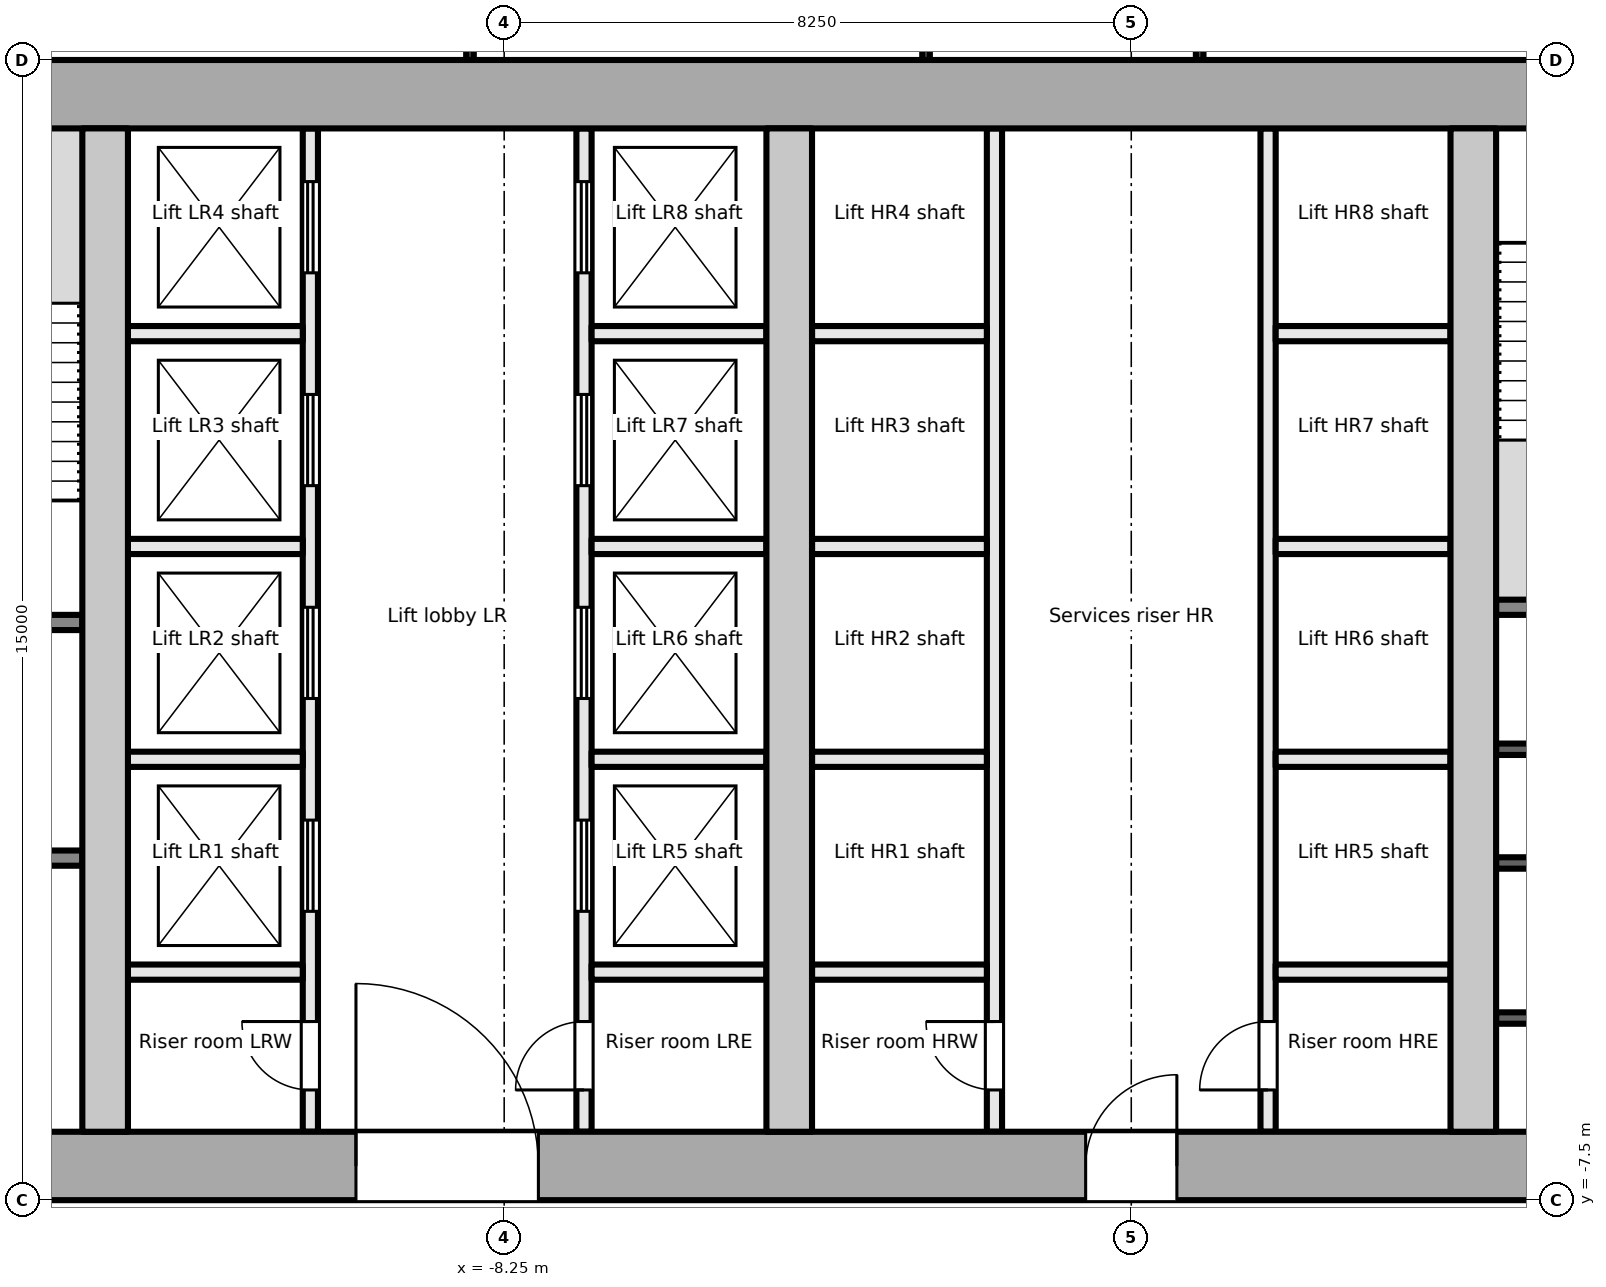
"""IFC4 building model, lengths in metres.
Left out: names, types, materials, properties, quantities, classifications, styles, units other than length and angle.
Written with IfcOpenShell. Run it as: python <this file> out.ifc"""

import sys

from ifc_helpers import new_model, si_unit, direction, frame, frame_2d, origin, place, context, subcontext, project, spatial, rectangle, extrude, element, fill, save


model = new_model("IFC4")
c1 = context("Model", 3, precision=1e-05, world=origin(), true_north=direction((0.0, 1.0)))
c2 = subcontext(c1, "Body", "Model", "MODEL_VIEW")
j1 = project(units=[si_unit("LENGTHUNIT", "METRE"), si_unit("PLANEANGLEUNIT", "RADIAN")], contexts=[c1])
p1 = place(None, origin())
s1 = spatial("IfcSite", under=j1, at=p1, CompositionType="ELEMENT")
p2 = place(p1, origin())
s2 = spatial("IfcBuilding", under=s1, at=p2, CompositionType="ELEMENT")
p3 = place(p2, frame((0.0, 0.0, 130.1)))
s3 = spatial("IfcBuildingStorey", under=s2, at=p3, CompositionType="ELEMENT", Elevation=130.1)
p4 = place(p3, frame((-18.0, -7.05, -0.2), z_axis=(0.0, 0.0, 1.0), x_axis=(1.0, 0.0, 0.0)))
e1 = element("IfcWall", 1, at=p4, inside=s3, PredefinedType="SHEAR", context=c2, shape_type="SweptSolid", body=[
    extrude(rectangle(XDim=36.0, YDim=0.9, at=frame_2d((18.0, 0.0))), origin(), (0.0, 0.0, 1.0), 4.0),
])
p5 = place(p4, frame((7.8, 0.0, 0.2)))
e2 = element("IfcOpeningElement", 2, at=p5, cuts=e1, PredefinedType="OPENING", context=c2, shape_type="SweptSolid", body=[
    extrude(rectangle(XDim=2.4, YDim=2.1, at=frame_2d((1.2, 1.05))), frame((0.0, 0.46, 0.0), z_axis=(0.0, -1.0, 0.0), x_axis=(1.0, 0.0, 0.0)), (0.0, 0.0, 1.0), 0.921),
])
p6 = place(p4, frame((17.4, 0.0, 0.2)))
e3 = element("IfcOpeningElement", 3, at=p6, cuts=e1, PredefinedType="OPENING", context=c2, shape_type="SweptSolid", body=[
    extrude(rectangle(XDim=1.2, YDim=2.1, at=frame_2d((0.6, 1.05))), frame((0.0, 0.46, 0.0), z_axis=(0.0, -1.0, 0.0), x_axis=(1.0, 0.0, 0.0)), (0.0, 0.0, 1.0), 0.921),
])
p7 = place(p4, frame((26.1, 0.0, 0.2)))
e4 = element("IfcOpeningElement", 4, at=p7, cuts=e1, PredefinedType="OPENING", context=c2, shape_type="SweptSolid", body=[
    extrude(rectangle(XDim=2.4, YDim=2.1, at=frame_2d((1.2, 1.05))), frame((0.0, 0.46, 0.0), z_axis=(0.0, -1.0, 0.0), x_axis=(1.0, 0.0, 0.0)), (0.0, 0.0, 1.0), 0.921),
])
p8 = place(p3, frame((-18.0, 7.05, -0.2), z_axis=(0.0, 0.0, 1.0), x_axis=(1.0, 0.0, 0.0)))
e5 = element("IfcWall", 5, at=p8, inside=s3, PredefinedType="SHEAR", context=c2, shape_type="SweptSolid", body=[
    extrude(rectangle(XDim=36.0, YDim=0.9, at=frame_2d((18.0, 0.0))), origin(), (0.0, 0.0, 1.0), 4.0),
])
for number, where, z_axis, x_axis in (
    (6, (-13.5, -6.6, -0.2), (0.0, 0.0, 1.0), (0.0, 1.0, 0.0)),
    (7, (-4.5, -6.6, -0.2), (0.0, 0.0, 1.0), (0.0, 1.0, 0.0)),
    (8, (4.5, -6.6, -0.2), (0.0, 0.0, 1.0), (0.0, 1.0, 0.0)),
):
    element("IfcWall", number, at=place(p3, frame(where, z_axis=z_axis, x_axis=x_axis)), inside=s3, PredefinedType="SHEAR", context=c2, shape_type="SweptSolid", body=[
        extrude(rectangle(XDim=13.2, YDim=0.6, at=frame_2d((6.6, 0.0))), origin(), (0.0, 0.0, 1.0), 4.0),
    ])
p9 = place(p3, frame((-17.1, -3.0, 0.0), z_axis=(0.0, 0.0, 1.0), x_axis=(1.0, 0.0, 0.0)))
e9 = element("IfcWall", 9, at=p9, inside=s3, PredefinedType="PARTITIONING", context=c2, shape_type="SweptSolid", body=[
    extrude(rectangle(XDim=3.3, YDim=0.2, at=frame_2d((1.65, 0.0))), origin(), (0.0, 0.0, 1.0), 3.8),
])
p10 = place(p9, frame((1.1, 0.0, 0.0)))
e10 = element("IfcOpeningElement", 10, at=p10, cuts=e9, PredefinedType="OPENING", context=c2, shape_type="SweptSolid", body=[
    extrude(rectangle(XDim=1.1, YDim=2.1, at=frame_2d((0.55, 1.05))), frame((0.0, 0.111, 0.0), z_axis=(0.0, -1.0, 0.0), x_axis=(1.0, 0.0, 0.0)), (0.0, 0.0, 1.0), 0.221),
])
p11 = place(p3, frame((-17.1, 0.1, 0.0), z_axis=(0.0, 0.0, 1.0), x_axis=(1.0, 0.0, 0.0)))
e11 = element("IfcWall", 11, at=p11, inside=s3, PredefinedType="PARTITIONING", context=c2, shape_type="SweptSolid", body=[
    extrude(rectangle(XDim=3.3, YDim=0.2, at=frame_2d((1.65, 0.0))), origin(), (0.0, 0.0, 1.0), 3.8),
])
p12 = place(p11, frame((1.1, 0.0, 0.0)))
e12 = element("IfcOpeningElement", 12, at=p12, cuts=e11, PredefinedType="OPENING", context=c2, shape_type="SweptSolid", body=[
    extrude(rectangle(XDim=1.1, YDim=2.1, at=frame_2d((0.55, 1.05))), frame((0.0, 0.111, 0.0), z_axis=(0.0, -1.0, 0.0), x_axis=(1.0, 0.0, 0.0)), (0.0, 0.0, 1.0), 0.221),
])
p13 = place(p3, frame((-10.8, -6.6, 0.0), z_axis=(0.0, 0.0, 1.0), x_axis=(0.0, 1.0, 0.0)))
e13 = element("IfcWall", 13, at=p13, inside=s3, PredefinedType="PARTITIONING", context=c2, shape_type="SweptSolid", body=[
    extrude(rectangle(XDim=13.2, YDim=0.2, at=frame_2d((6.6, 0.0))), origin(), (0.0, 0.0, 1.0), 3.8),
])
p14 = place(p13, frame((0.55, 0.0, 0.0)))
e14 = element("IfcOpeningElement", 14, at=p14, cuts=e13, PredefinedType="OPENING", context=c2, shape_type="SweptSolid", body=[
    extrude(rectangle(XDim=0.9, YDim=2.1, at=frame_2d((0.45, 1.05))), frame((0.0, 0.111, 0.0), z_axis=(0.0, -1.0, 0.0), x_axis=(1.0, 0.0, 0.0)), (0.0, 0.0, 1.0), 0.221),
])
p15 = place(p13, frame((2.9, 0.0, 0.0)))
e15 = element("IfcOpeningElement", 15, at=p15, cuts=e13, PredefinedType="OPENING", context=c2, shape_type="SweptSolid", body=[
    extrude(rectangle(XDim=1.2, YDim=2.1, at=frame_2d((0.6, 1.05))), frame((0.0, 0.111, 0.0), z_axis=(0.0, -1.0, 0.0), x_axis=(1.0, 0.0, 0.0)), (0.0, 0.0, 1.0), 0.221),
])
p16 = place(p13, frame((5.7, 0.0, 0.0)))
e16 = element("IfcOpeningElement", 16, at=p16, cuts=e13, PredefinedType="OPENING", context=c2, shape_type="SweptSolid", body=[
    extrude(rectangle(XDim=1.2, YDim=2.1, at=frame_2d((0.6, 1.05))), frame((0.0, 0.111, 0.0), z_axis=(0.0, -1.0, 0.0), x_axis=(1.0, 0.0, 0.0)), (0.0, 0.0, 1.0), 0.221),
])
p17 = place(p13, frame((8.5, 0.0, 0.0)))
e17 = element("IfcOpeningElement", 17, at=p17, cuts=e13, PredefinedType="OPENING", context=c2, shape_type="SweptSolid", body=[
    extrude(rectangle(XDim=1.2, YDim=2.1, at=frame_2d((0.6, 1.05))), frame((0.0, 0.111, 0.0), z_axis=(0.0, -1.0, 0.0), x_axis=(1.0, 0.0, 0.0)), (0.0, 0.0, 1.0), 0.221),
])
p18 = place(p13, frame((11.3, 0.0, 0.0)))
e18 = element("IfcOpeningElement", 18, at=p18, cuts=e13, PredefinedType="OPENING", context=c2, shape_type="SweptSolid", body=[
    extrude(rectangle(XDim=1.2, YDim=2.1, at=frame_2d((0.6, 1.05))), frame((0.0, 0.111, 0.0), z_axis=(0.0, -1.0, 0.0), x_axis=(1.0, 0.0, 0.0)), (0.0, 0.0, 1.0), 0.221),
])
p19 = place(p3, frame((-7.2, -6.6, 0.0), z_axis=(0.0, 0.0, 1.0), x_axis=(0.0, 1.0, 0.0)))
e19 = element("IfcWall", 19, at=p19, inside=s3, PredefinedType="PARTITIONING", context=c2, shape_type="SweptSolid", body=[
    extrude(rectangle(XDim=13.2, YDim=0.2, at=frame_2d((6.6, 0.0))), origin(), (0.0, 0.0, 1.0), 3.8),
])
p20 = place(p19, frame((0.55, 0.0, 0.0)))
e20 = element("IfcOpeningElement", 20, at=p20, cuts=e19, PredefinedType="OPENING", context=c2, shape_type="SweptSolid", body=[
    extrude(rectangle(XDim=0.9, YDim=2.1, at=frame_2d((0.45, 1.05))), frame((0.0, 0.111, 0.0), z_axis=(0.0, -1.0, 0.0), x_axis=(1.0, 0.0, 0.0)), (0.0, 0.0, 1.0), 0.221),
])
p21 = place(p19, frame((2.9, 0.0, 0.0)))
e21 = element("IfcOpeningElement", 21, at=p21, cuts=e19, PredefinedType="OPENING", context=c2, shape_type="SweptSolid", body=[
    extrude(rectangle(XDim=1.2, YDim=2.1, at=frame_2d((0.6, 1.05))), frame((0.0, 0.111, 0.0), z_axis=(0.0, -1.0, 0.0), x_axis=(1.0, 0.0, 0.0)), (0.0, 0.0, 1.0), 0.221),
])
p22 = place(p19, frame((5.7, 0.0, 0.0)))
e22 = element("IfcOpeningElement", 22, at=p22, cuts=e19, PredefinedType="OPENING", context=c2, shape_type="SweptSolid", body=[
    extrude(rectangle(XDim=1.2, YDim=2.1, at=frame_2d((0.6, 1.05))), frame((0.0, 0.111, 0.0), z_axis=(0.0, -1.0, 0.0), x_axis=(1.0, 0.0, 0.0)), (0.0, 0.0, 1.0), 0.221),
])
p23 = place(p19, frame((8.5, 0.0, 0.0)))
e23 = element("IfcOpeningElement", 23, at=p23, cuts=e19, PredefinedType="OPENING", context=c2, shape_type="SweptSolid", body=[
    extrude(rectangle(XDim=1.2, YDim=2.1, at=frame_2d((0.6, 1.05))), frame((0.0, 0.111, 0.0), z_axis=(0.0, -1.0, 0.0), x_axis=(1.0, 0.0, 0.0)), (0.0, 0.0, 1.0), 0.221),
])
p24 = place(p19, frame((11.3, 0.0, 0.0)))
e24 = element("IfcOpeningElement", 24, at=p24, cuts=e19, PredefinedType="OPENING", context=c2, shape_type="SweptSolid", body=[
    extrude(rectangle(XDim=1.2, YDim=2.1, at=frame_2d((0.6, 1.05))), frame((0.0, 0.111, 0.0), z_axis=(0.0, -1.0, 0.0), x_axis=(1.0, 0.0, 0.0)), (0.0, 0.0, 1.0), 0.221),
])
for number, where, z_axis, x_axis in (
    (25, (-13.2, -1.7, 0.0), (0.0, 0.0, 1.0), (1.0, 0.0, 0.0)),
    (26, (-13.2, 1.1, 0.0), (0.0, 0.0, 1.0), (1.0, 0.0, 0.0)),
    (27, (-13.2, 3.9, 0.0), (0.0, 0.0, 1.0), (1.0, 0.0, 0.0)),
    (28, (-13.2, -4.5, 0.0), (0.0, 0.0, 1.0), (1.0, 0.0, 0.0)),
    (29, (-7.1, -1.7, 0.0), (0.0, 0.0, 1.0), (1.0, 0.0, 0.0)),
    (30, (-7.1, 1.1, 0.0), (0.0, 0.0, 1.0), (1.0, 0.0, 0.0)),
    (31, (-7.1, 3.9, 0.0), (0.0, 0.0, 1.0), (1.0, 0.0, 0.0)),
    (32, (-7.1, -4.5, 0.0), (0.0, 0.0, 1.0), (1.0, 0.0, 0.0)),
):
    element("IfcWall", number, at=place(p3, frame(where, z_axis=z_axis, x_axis=x_axis)), inside=s3, PredefinedType="PARTITIONING", context=c2, shape_type="SweptSolid", body=[
        extrude(rectangle(XDim=2.3, YDim=0.2, at=frame_2d((1.15, 0.0))), origin(), (0.0, 0.0, 1.0), 3.8),
    ])
p25 = place(p3, frame((-1.8, -6.6, 0.0), z_axis=(0.0, 0.0, 1.0), x_axis=(0.0, 1.0, 0.0)))
e33 = element("IfcWall", 33, at=p25, inside=s3, PredefinedType="PARTITIONING", context=c2, shape_type="SweptSolid", body=[
    extrude(rectangle(XDim=13.2, YDim=0.2, at=frame_2d((6.6, 0.0))), origin(), (0.0, 0.0, 1.0), 3.8),
])
p26 = place(p25, frame((0.55, 0.0, 0.0)))
e34 = element("IfcOpeningElement", 34, at=p26, cuts=e33, PredefinedType="OPENING", context=c2, shape_type="SweptSolid", body=[
    extrude(rectangle(XDim=0.9, YDim=2.1, at=frame_2d((0.45, 1.05))), frame((0.0, 0.111, 0.0), z_axis=(0.0, -1.0, 0.0), x_axis=(1.0, 0.0, 0.0)), (0.0, 0.0, 1.0), 0.221),
])
p27 = place(p3, frame((1.8, -6.6, 0.0), z_axis=(0.0, 0.0, 1.0), x_axis=(0.0, 1.0, 0.0)))
e35 = element("IfcWall", 35, at=p27, inside=s3, PredefinedType="PARTITIONING", context=c2, shape_type="SweptSolid", body=[
    extrude(rectangle(XDim=13.2, YDim=0.2, at=frame_2d((6.6, 0.0))), origin(), (0.0, 0.0, 1.0), 3.8),
])
p28 = place(p27, frame((0.55, 0.0, 0.0)))
e36 = element("IfcOpeningElement", 36, at=p28, cuts=e35, PredefinedType="OPENING", context=c2, shape_type="SweptSolid", body=[
    extrude(rectangle(XDim=0.9, YDim=2.1, at=frame_2d((0.45, 1.05))), frame((0.0, 0.111, 0.0), z_axis=(0.0, -1.0, 0.0), x_axis=(1.0, 0.0, 0.0)), (0.0, 0.0, 1.0), 0.221),
])
for number, where, z_axis, x_axis in (
    (37, (-4.2, -1.7, 0.0), (0.0, 0.0, 1.0), (1.0, 0.0, 0.0)),
    (38, (-4.2, 1.1, 0.0), (0.0, 0.0, 1.0), (1.0, 0.0, 0.0)),
    (39, (-4.2, 3.9, 0.0), (0.0, 0.0, 1.0), (1.0, 0.0, 0.0)),
    (40, (-4.2, -4.5, 0.0), (0.0, 0.0, 1.0), (1.0, 0.0, 0.0)),
    (41, (1.9, -1.7, 0.0), (0.0, 0.0, 1.0), (1.0, 0.0, 0.0)),
    (42, (1.9, 1.1, 0.0), (0.0, 0.0, 1.0), (1.0, 0.0, 0.0)),
    (43, (1.9, 3.9, 0.0), (0.0, 0.0, 1.0), (1.0, 0.0, 0.0)),
    (44, (1.9, -4.5, 0.0), (0.0, 0.0, 1.0), (1.0, 0.0, 0.0)),
):
    element("IfcWall", number, at=place(p3, frame(where, z_axis=z_axis, x_axis=x_axis)), inside=s3, PredefinedType="PARTITIONING", context=c2, shape_type="SweptSolid", body=[
        extrude(rectangle(XDim=2.3, YDim=0.2, at=frame_2d((1.15, 0.0))), origin(), (0.0, 0.0, 1.0), 3.8),
    ])
p29 = place(p3, frame((4.8, 0.3, 0.0), z_axis=(0.0, 0.0, 1.0), x_axis=(1.0, 0.0, 0.0)))
e45 = element("IfcWall", 45, at=p29, inside=s3, PredefinedType="PARTITIONING", context=c2, shape_type="SweptSolid", body=[
    extrude(rectangle(XDim=3.15, YDim=0.2, at=frame_2d((1.575, 0.0))), origin(), (0.0, 0.0, 1.0), 3.8),
])
for number, where, z_axis, x_axis in (
    (46, (4.8, -5.104, 0.0), (0.0, 0.0, 1.0), (1.0, 0.0, 0.0)),
    (47, (4.8, -3.064, 0.0), (0.0, 0.0, 1.0), (1.0, 0.0, 0.0)),
    (48, (4.8, -1.568, 0.0), (0.0, 0.0, 1.0), (1.0, 0.0, 0.0)),
):
    element("IfcWall", number, at=place(p3, frame(where, z_axis=z_axis, x_axis=x_axis)), inside=s3, PredefinedType="PARTITIONING", context=c2, shape_type="SweptSolid", body=[
        extrude(rectangle(XDim=3.15, YDim=0.15, at=frame_2d((1.575, 0.0))), origin(), (0.0, 0.0, 1.0), 3.8),
    ])
p30 = place(p3, frame((-8.7, 7.5, 0.0), z_axis=(0.0, 0.0, 1.0), x_axis=(0.0, 1.0, 0.0)))
e49 = element("IfcWall", 49, at=p30, inside=s3, PredefinedType="PARTITIONING", context=c2, shape_type="SweptSolid", body=[
    extrude(rectangle(XDim=2.95, YDim=0.1, at=frame_2d((1.475, 0.0))), origin(), (0.0, 0.0, 1.0), 3.8),
])
p31 = place(p30, frame((0.575, 0.0, 0.9)))
e50 = element("IfcOpeningElement", 50, at=p31, cuts=e49, PredefinedType="OPENING", context=c2, shape_type="SweptSolid", body=[
    extrude(rectangle(XDim=1.8, YDim=1.2, at=frame_2d((0.9, 0.6))), frame((0.0, 0.061, 0.0), z_axis=(0.0, -1.0, 0.0), x_axis=(1.0, 0.0, 0.0)), (0.0, 0.0, 1.0), 0.121),
])
for number, where, z_axis, x_axis in (
    (51, (-2.7, 10.45, 0.0), (0.0, 0.0, 1.0), (0.0, -1.0, 0.0)),
    (52, (0.9, 10.45, 0.0), (0.0, 0.0, 1.0), (0.0, -1.0, 0.0)),
):
    element("IfcWall", number, at=place(p3, frame(where, z_axis=z_axis, x_axis=x_axis)), inside=s3, PredefinedType="PARTITIONING", context=c2, shape_type="SweptSolid", body=[
        extrude(rectangle(XDim=2.95, YDim=0.1, at=frame_2d((1.475, 0.0))), origin(), (0.0, 0.0, 1.0), 3.8),
    ])
p32 = place(p14, origin())
e53 = element("IfcDoor", 53, at=p32, inside=s3, OperationType="SINGLE_SWING_RIGHT", PredefinedType="DOOR", context=c2, shape_type="SweptSolid", body=[
    extrude(rectangle(XDim=0.9, YDim=2.1, at=frame_2d((0.45, 1.05))), frame((0.0, 0.025, 0.0), z_axis=(0.0, -1.0, 0.0), x_axis=(1.0, 0.0, 0.0)), (0.0, 0.0, 1.0), 0.05),
])
fill(e14, e53)
p33 = place(p15, origin())
e54 = element("IfcDoor", 54, at=p33, inside=s3, OperationType="DOUBLE_DOOR_SLIDING", PredefinedType="DOOR", context=c2, shape_type="SweptSolid", body=[
    extrude(rectangle(XDim=1.2, YDim=2.1, at=frame_2d((0.6, 1.05))), frame((0.0, 0.025, 0.0), z_axis=(0.0, -1.0, 0.0), x_axis=(1.0, 0.0, 0.0)), (0.0, 0.0, 1.0), 0.05),
])
fill(e15, e54)
p34 = place(p16, origin())
e55 = element("IfcDoor", 55, at=p34, inside=s3, OperationType="DOUBLE_DOOR_SLIDING", PredefinedType="DOOR", context=c2, shape_type="SweptSolid", body=[
    extrude(rectangle(XDim=1.2, YDim=2.1, at=frame_2d((0.6, 1.05))), frame((0.0, 0.025, 0.0), z_axis=(0.0, -1.0, 0.0), x_axis=(1.0, 0.0, 0.0)), (0.0, 0.0, 1.0), 0.05),
])
fill(e16, e55)
p35 = place(p17, origin())
e56 = element("IfcDoor", 56, at=p35, inside=s3, OperationType="DOUBLE_DOOR_SLIDING", PredefinedType="DOOR", context=c2, shape_type="SweptSolid", body=[
    extrude(rectangle(XDim=1.2, YDim=2.1, at=frame_2d((0.6, 1.05))), frame((0.0, 0.025, 0.0), z_axis=(0.0, -1.0, 0.0), x_axis=(1.0, 0.0, 0.0)), (0.0, 0.0, 1.0), 0.05),
])
fill(e17, e56)
p36 = place(p18, origin())
e57 = element("IfcDoor", 57, at=p36, inside=s3, OperationType="DOUBLE_DOOR_SLIDING", PredefinedType="DOOR", context=c2, shape_type="SweptSolid", body=[
    extrude(rectangle(XDim=1.2, YDim=2.1, at=frame_2d((0.6, 1.05))), frame((0.0, 0.025, 0.0), z_axis=(0.0, -1.0, 0.0), x_axis=(1.0, 0.0, 0.0)), (0.0, 0.0, 1.0), 0.05),
])
fill(e18, e57)
p37 = place(p20, origin())
e58 = element("IfcDoor", 58, at=p37, inside=s3, OperationType="SINGLE_SWING_LEFT", PredefinedType="DOOR", context=c2, shape_type="SweptSolid", body=[
    extrude(rectangle(XDim=0.9, YDim=2.1, at=frame_2d((0.45, 1.05))), frame((0.0, 0.025, 0.0), z_axis=(0.0, -1.0, 0.0), x_axis=(1.0, 0.0, 0.0)), (0.0, 0.0, 1.0), 0.05),
])
fill(e20, e58)
p38 = place(p21, origin())
e59 = element("IfcDoor", 59, at=p38, inside=s3, OperationType="DOUBLE_DOOR_SLIDING", PredefinedType="DOOR", context=c2, shape_type="SweptSolid", body=[
    extrude(rectangle(XDim=1.2, YDim=2.1, at=frame_2d((0.6, 1.05))), frame((0.0, 0.025, 0.0), z_axis=(0.0, -1.0, 0.0), x_axis=(1.0, 0.0, 0.0)), (0.0, 0.0, 1.0), 0.05),
])
fill(e21, e59)
p39 = place(p22, origin())
e60 = element("IfcDoor", 60, at=p39, inside=s3, OperationType="DOUBLE_DOOR_SLIDING", PredefinedType="DOOR", context=c2, shape_type="SweptSolid", body=[
    extrude(rectangle(XDim=1.2, YDim=2.1, at=frame_2d((0.6, 1.05))), frame((0.0, 0.025, 0.0), z_axis=(0.0, -1.0, 0.0), x_axis=(1.0, 0.0, 0.0)), (0.0, 0.0, 1.0), 0.05),
])
fill(e22, e60)
p40 = place(p23, origin())
e61 = element("IfcDoor", 61, at=p40, inside=s3, OperationType="DOUBLE_DOOR_SLIDING", PredefinedType="DOOR", context=c2, shape_type="SweptSolid", body=[
    extrude(rectangle(XDim=1.2, YDim=2.1, at=frame_2d((0.6, 1.05))), frame((0.0, 0.025, 0.0), z_axis=(0.0, -1.0, 0.0), x_axis=(1.0, 0.0, 0.0)), (0.0, 0.0, 1.0), 0.05),
])
fill(e23, e61)
p41 = place(p24, origin())
e62 = element("IfcDoor", 62, at=p41, inside=s3, OperationType="DOUBLE_DOOR_SLIDING", PredefinedType="DOOR", context=c2, shape_type="SweptSolid", body=[
    extrude(rectangle(XDim=1.2, YDim=2.1, at=frame_2d((0.6, 1.05))), frame((0.0, 0.025, 0.0), z_axis=(0.0, -1.0, 0.0), x_axis=(1.0, 0.0, 0.0)), (0.0, 0.0, 1.0), 0.05),
])
fill(e24, e62)
p42 = place(p5, origin())
e63 = element("IfcDoor", 63, at=p42, inside=s3, OperationType="DOUBLE_DOOR_DOUBLE_SWING", PredefinedType="DOOR", context=c2, shape_type="SweptSolid", body=[
    extrude(rectangle(XDim=2.4, YDim=2.1, at=frame_2d((1.2, 1.05))), frame((0.0, 0.025, 0.0), z_axis=(0.0, -1.0, 0.0), x_axis=(1.0, 0.0, 0.0)), (0.0, 0.0, 1.0), 0.05),
])
fill(e2, e63)
p43 = place(p26, origin())
e64 = element("IfcDoor", 64, at=p43, inside=s3, OperationType="SINGLE_SWING_RIGHT", PredefinedType="DOOR", context=c2, shape_type="SweptSolid", body=[
    extrude(rectangle(XDim=0.9, YDim=2.1, at=frame_2d((0.45, 1.05))), frame((0.0, 0.025, 0.0), z_axis=(0.0, -1.0, 0.0), x_axis=(1.0, 0.0, 0.0)), (0.0, 0.0, 1.0), 0.05),
])
fill(e34, e64)
p44 = place(p28, origin())
e65 = element("IfcDoor", 65, at=p44, inside=s3, OperationType="SINGLE_SWING_LEFT", PredefinedType="DOOR", context=c2, shape_type="SweptSolid", body=[
    extrude(rectangle(XDim=0.9, YDim=2.1, at=frame_2d((0.45, 1.05))), frame((0.0, 0.025, 0.0), z_axis=(0.0, -1.0, 0.0), x_axis=(1.0, 0.0, 0.0)), (0.0, 0.0, 1.0), 0.05),
])
fill(e36, e65)
p45 = place(p6, origin())
e66 = element("IfcDoor", 66, at=p45, inside=s3, OperationType="SINGLE_SWING_RIGHT", PredefinedType="DOOR", context=c2, shape_type="SweptSolid", body=[
    extrude(rectangle(XDim=1.2, YDim=2.1, at=frame_2d((0.6, 1.05))), frame((0.0, 0.025, 0.0), z_axis=(0.0, -1.0, 0.0), x_axis=(1.0, 0.0, 0.0)), (0.0, 0.0, 1.0), 0.05),
])
fill(e3, e66)
save(model, sys.argv[1])
